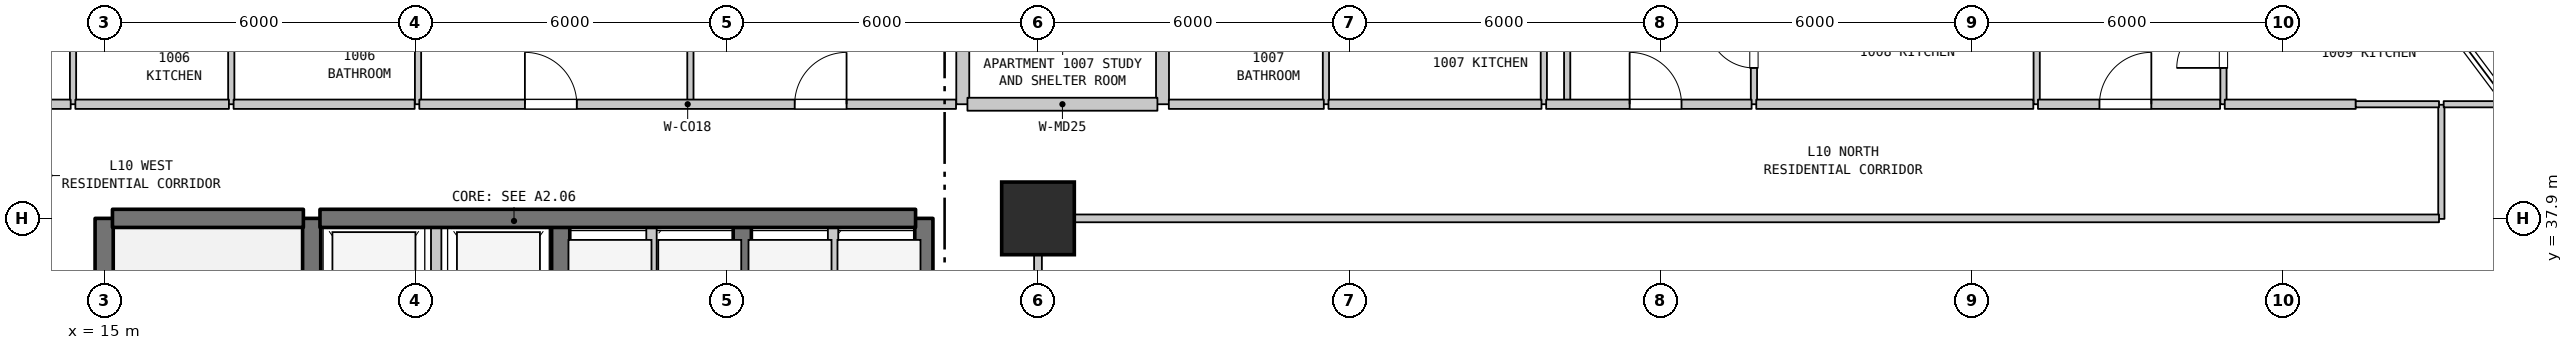
"""IFC4 building model, lengths in metres.
Left out: names, types, materials, properties, quantities, classifications, styles, units other than length and angle.
Written with IfcOpenShell. Run it as: python <this file> out.ifc"""

import sys

from ifc_helpers import new_model, si_unit, direction, frame, frame_2d, origin, origin_2d, place, context, subcontext, project, spatial, rectangle, extrude, element, fill, save


model = new_model("IFC4")
c1 = context("Model", 3, precision=1e-05, world=origin(), true_north=direction((0.0, 1.0)))
c2 = subcontext(c1, "Body", "Model", "MODEL_VIEW")
j1 = project(units=[si_unit("LENGTHUNIT", "METRE"), si_unit("PLANEANGLEUNIT", "RADIAN")], contexts=[c1])
p1 = place(None, origin())
s1 = spatial("IfcSite", under=j1, at=p1, CompositionType="ELEMENT")
p2 = place(p1, origin())
s2 = spatial("IfcBuilding", under=s1, at=p2, CompositionType="ELEMENT")
p3 = place(p2, frame((0.0, 0.0, 46.2)))
s3 = spatial("IfcBuildingStorey", under=s2, at=p3, CompositionType="ELEMENT", Elevation=46.2)
p4 = place(p3, frame((33.0, 37.9, 0.0), z_axis=(0.0, 0.0, 1.0), x_axis=(1.0, 0.0, 0.0)))
e1 = element("IfcColumn", 1, at=p4, inside=s3, PredefinedType="COLUMN", context=c2, shape_type="SweptSolid", body=[
    extrude(rectangle(XDim=1.4, YDim=1.4, at=origin_2d()), origin(), (0.0, 0.0, 1.0), 3.7),
])
p5 = place(p3, frame((14.4, 40.1, 0.0), z_axis=(0.0, 0.0, 1.0), x_axis=(0.0, 1.0, 0.0)))
e2 = element("IfcWall", 2, at=p5, inside=s3, PredefinedType="PARTITIONING", context=c2, shape_type="SweptSolid", body=[
    extrude(rectangle(XDim=2.3, YDim=0.12, at=frame_2d((1.15, 0.0))), origin(), (0.0, 0.0, 1.0), 3.385),
])
p6 = place(p3, frame((15.0, 31.1, 0.0), z_axis=(0.0, 0.0, 1.0), x_axis=(0.0, 1.0, 0.0)))
e3 = element("IfcWall", 3, at=p6, inside=s3, PredefinedType="SHEAR", context=c2, shape_type="SweptSolid", body=[
    extrude(rectangle(XDim=6.8, YDim=0.35, at=frame_2d((3.4, 0.0))), origin(), (0.0, 0.0, 1.0), 3.385),
])
p7 = place(p3, frame((17.45, 40.1, 0.0), z_axis=(0.0, 0.0, 1.0), x_axis=(0.0, 1.0, 0.0)))
e4 = element("IfcWall", 4, at=p7, inside=s3, PredefinedType="PARTITIONING", context=c2, shape_type="SweptSolid", body=[
    extrude(rectangle(XDim=2.3, YDim=0.12, at=frame_2d((1.15, 0.0))), origin(), (0.0, 0.0, 1.0), 3.385),
])
p8 = place(p3, frame((19.0, 35.0, 0.0), z_axis=(0.0, 0.0, 1.0), x_axis=(0.0, 1.0, 0.0)))
e5 = element("IfcWall", 5, at=p8, inside=s3, PredefinedType="SHEAR", context=c2, shape_type="SweptSolid", body=[
    extrude(rectangle(XDim=2.9, YDim=0.35, at=frame_2d((1.45, 0.0))), origin(), (0.0, 0.0, 1.0), 3.385),
])
p9 = place(p3, frame((21.05, 40.1, 0.0), z_axis=(0.0, 0.0, 1.0), x_axis=(0.0, 1.0, 0.0)))
e6 = element("IfcWall", 6, at=p9, inside=s3, PredefinedType="PARTITIONING", context=c2, shape_type="SweptSolid", body=[
    extrude(rectangle(XDim=2.3, YDim=0.12, at=frame_2d((1.15, 0.0))), origin(), (0.0, 0.0, 1.0), 3.025),
])
p10 = place(p3, frame((21.4, 35.0, 0.0), z_axis=(0.0, 0.0, 1.0), x_axis=(0.0, 1.0, 0.0)))
e7 = element("IfcWall", 7, at=p10, inside=s3, PredefinedType="STANDARD", context=c2, shape_type="SweptSolid", body=[
    extrude(rectangle(XDim=2.9, YDim=0.2, at=frame_2d((1.45, 0.0))), origin(), (0.0, 0.0, 1.0), 3.385),
])
p11 = place(p3, frame((23.8, 35.0, 0.0), z_axis=(0.0, 0.0, 1.0), x_axis=(0.0, 1.0, 0.0)))
e8 = element("IfcWall", 8, at=p11, inside=s3, PredefinedType="SHEAR", context=c2, shape_type="SweptSolid", body=[
    extrude(rectangle(XDim=2.9, YDim=0.35, at=frame_2d((1.45, 0.0))), origin(), (0.0, 0.0, 1.0), 3.385),
])
p12 = place(p3, frame((25.55, 35.0, 0.0), z_axis=(0.0, 0.0, 1.0), x_axis=(0.0, 1.0, 0.0)))
e9 = element("IfcWall", 9, at=p12, inside=s3, PredefinedType="STANDARD", context=c2, shape_type="SweptSolid", body=[
    extrude(rectangle(XDim=2.9, YDim=0.2, at=frame_2d((1.45, 0.0))), origin(), (0.0, 0.0, 1.0), 3.385),
])
p13 = place(p3, frame((26.3, 40.1, 0.0), z_axis=(0.0, 0.0, 1.0), x_axis=(0.0, 1.0, 0.0)))
e10 = element("IfcWall", 10, at=p13, inside=s3, PredefinedType="PARTITIONING", context=c2, shape_type="SweptSolid", body=[
    extrude(rectangle(XDim=2.05, YDim=0.12, at=frame_2d((1.025, 0.0))), origin(), (0.0, 0.0, 1.0), 3.385),
])
p14 = place(p3, frame((27.3, 35.0, 0.0), z_axis=(0.0, 0.0, 1.0), x_axis=(0.0, 1.0, 0.0)))
e11 = element("IfcWall", 11, at=p14, inside=s3, PredefinedType="SHEAR", context=c2, shape_type="SweptSolid", body=[
    extrude(rectangle(XDim=2.9, YDim=0.35, at=frame_2d((1.45, 0.0))), origin(), (0.0, 0.0, 1.0), 3.385),
])
p15 = place(p3, frame((29.05, 35.0, 0.0), z_axis=(0.0, 0.0, 1.0), x_axis=(0.0, 1.0, 0.0)))
e12 = element("IfcWall", 12, at=p15, inside=s3, PredefinedType="STANDARD", context=c2, shape_type="SweptSolid", body=[
    extrude(rectangle(XDim=2.9, YDim=0.2, at=frame_2d((1.45, 0.0))), origin(), (0.0, 0.0, 1.0), 3.385),
])
p16 = place(p3, frame((30.8, 35.0, 0.0), z_axis=(0.0, 0.0, 1.0), x_axis=(0.0, 1.0, 0.0)))
e13 = element("IfcWall", 13, at=p16, inside=s3, PredefinedType="SHEAR", context=c2, shape_type="SweptSolid", body=[
    extrude(rectangle(XDim=2.9, YDim=0.35, at=frame_2d((1.45, 0.0))), origin(), (0.0, 0.0, 1.0), 3.385),
])
p17 = place(p3, frame((31.55, 40.1, 0.0), z_axis=(0.0, 0.0, 1.0), x_axis=(0.0, 1.0, 0.0)))
e14 = element("IfcWall", 14, at=p17, inside=s3, PredefinedType="STANDARD", context=c2, shape_type="SweptSolid", body=[
    extrude(rectangle(XDim=2.3, YDim=0.25, at=frame_2d((1.15, 0.0))), origin(), (0.0, 0.0, 1.0), 3.385),
])
p18 = place(p3, frame((33.0, 27.91, 0.0), z_axis=(0.0, 0.0, 1.0), x_axis=(0.0, 1.0, 0.0)))
e15 = element("IfcWall", 15, at=p18, inside=s3, PredefinedType="STANDARD", context=c2, shape_type="SweptSolid", body=[
    extrude(rectangle(XDim=9.98, YDim=0.15, at=frame_2d((4.99, 0.0))), origin(), (0.0, 0.0, 1.0), 2.885),
])
p19 = place(p3, frame((35.4, 40.1, 0.0), z_axis=(0.0, 0.0, 1.0), x_axis=(0.0, 1.0, 0.0)))
e16 = element("IfcWall", 16, at=p19, inside=s3, PredefinedType="STANDARD", context=c2, shape_type="SweptSolid", body=[
    extrude(rectangle(XDim=2.3, YDim=0.25, at=frame_2d((1.15, 0.0))), origin(), (0.0, 0.0, 1.0), 3.385),
])
for number, where, z_axis, x_axis in (
    (17, (38.55, 40.1, 0.0), (0.0, 0.0, 1.0), (0.0, 1.0, 0.0)),
    (18, (42.75, 40.1, 0.0), (0.0, 0.0, 1.0), (0.0, 1.0, 0.0)),
):
    element("IfcWall", number, at=place(p3, frame(where, z_axis=z_axis, x_axis=x_axis)), inside=s3, PredefinedType="PARTITIONING", context=c2, shape_type="SweptSolid", body=[
        extrude(rectangle(XDim=2.3, YDim=0.12, at=frame_2d((1.15, 0.0))), origin(), (0.0, 0.0, 1.0), 3.385),
    ])
p20 = place(p3, frame((43.2, 40.1, 0.0), z_axis=(0.0, 0.0, 1.0), x_axis=(0.0, 1.0, 0.0)))
e19 = element("IfcWall", 19, at=p20, inside=s3, PredefinedType="PARTITIONING", context=c2, shape_type="SweptSolid", body=[
    extrude(rectangle(XDim=13.79, YDim=0.12, at=frame_2d((6.895, 0.0))), origin(), (0.0, 0.0, 1.0), 3.385),
])
p21 = place(p3, frame((46.8, 40.1, 0.0), z_axis=(0.0, 0.0, 1.0), x_axis=(0.0, 1.0, 0.0)))
e20 = element("IfcWall", 20, at=p21, inside=s3, PredefinedType="PARTITIONING", context=c2, shape_type="SweptSolid", body=[
    extrude(rectangle(XDim=2.3, YDim=0.12, at=frame_2d((1.15, 0.0))), origin(), (0.0, 0.0, 1.0), 3.385),
])
p22 = place(p21, frame((0.7, 0.0, 0.0)))
e21 = element("IfcOpeningElement", 21, at=p22, cuts=e20, PredefinedType="OPENING", context=c2, shape_type="SweptSolid", body=[
    extrude(rectangle(XDim=0.9, YDim=2.15, at=frame_2d((0.45, 1.075))), frame((0.0, 0.07, 0.0), z_axis=(0.0, -1.0, 0.0), x_axis=(1.0, 0.0, 0.0)), (0.0, 0.0, 1.0), 0.14),
])
p23 = place(p3, frame((52.25, 40.1, 0.0), z_axis=(0.0, 0.0, 1.0), x_axis=(0.0, 1.0, 0.0)))
e22 = element("IfcWall", 22, at=p23, inside=s3, PredefinedType="PARTITIONING", context=c2, shape_type="SweptSolid", body=[
    extrude(rectangle(XDim=2.3, YDim=0.12, at=frame_2d((1.15, 0.0))), origin(), (0.0, 0.0, 1.0), 3.385),
])
p24 = place(p3, frame((55.85, 40.1, 0.0), z_axis=(0.0, 0.0, 1.0), x_axis=(0.0, 1.0, 0.0)))
e23 = element("IfcWall", 23, at=p24, inside=s3, PredefinedType="PARTITIONING", context=c2, shape_type="SweptSolid", body=[
    extrude(rectangle(XDim=2.3, YDim=0.12, at=frame_2d((1.15, 0.0))), origin(), (0.0, 0.0, 1.0), 3.385),
])
p25 = place(p24, frame((0.7, 0.0, 0.0)))
e24 = element("IfcOpeningElement", 24, at=p25, cuts=e23, PredefinedType="OPENING", context=c2, shape_type="SweptSolid", body=[
    extrude(rectangle(XDim=0.9, YDim=2.15, at=frame_2d((0.45, 1.075))), frame((0.0, 0.07, 0.0), z_axis=(0.0, -1.0, 0.0), x_axis=(1.0, 0.0, 0.0)), (0.0, 0.0, 1.0), 0.14),
])
p26 = place(p3, frame((60.05, 37.89, 0.0), z_axis=(0.0, 0.0, 1.0), x_axis=(0.0, 1.0, 0.0)))
e25 = element("IfcWall", 25, at=p26, inside=s3, PredefinedType="PARTITIONING", context=c2, shape_type="SweptSolid", body=[
    extrude(rectangle(XDim=2.2, YDim=0.12, at=frame_2d((1.1, 0.0))), origin(), (0.0, 0.0, 1.0), 3.385),
])
p27 = place(p3, frame((15.16, 37.9, 0.0), z_axis=(0.0, 0.0, 1.0), x_axis=(1.0, 0.0, 0.0)))
e26 = element("IfcWall", 26, at=p27, inside=s3, PredefinedType="SHEAR", context=c2, shape_type="SweptSolid", body=[
    extrude(rectangle(XDim=3.68, YDim=0.35, at=frame_2d((1.84, 0.0))), origin(), (0.0, 0.0, 1.0), 3.385),
])
p28 = place(p3, frame((19.16, 37.9, 0.0), z_axis=(0.0, 0.0, 1.0), x_axis=(1.0, 0.0, 0.0)))
e27 = element("IfcWall", 27, at=p28, inside=s3, PredefinedType="SHEAR", context=c2, shape_type="SweptSolid", body=[
    extrude(rectangle(XDim=11.48, YDim=0.35, at=frame_2d((5.74, 0.0))), origin(), (0.0, 0.0, 1.0), 3.385),
])
p29 = place(p3, frame((33.07, 37.9, 0.0), z_axis=(0.0, 0.0, 1.0), x_axis=(1.0, 0.0, 0.0)))
e28 = element("IfcWall", 28, at=p29, inside=s3, PredefinedType="STANDARD", context=c2, shape_type="SweptSolid", body=[
    extrude(rectangle(XDim=26.935, YDim=0.15, at=frame_2d((13.467, 0.0))), origin(), (0.0, 0.0, 1.0), 3.385),
])
p30 = place(p3, frame((12.875, 40.1, 0.0), z_axis=(0.0, 0.0, 1.0), x_axis=(1.0, 0.0, 0.0)))
e29 = element("IfcWall", 29, at=p30, inside=s3, PredefinedType="STANDARD", context=c2, shape_type="SweptSolid", body=[
    extrude(rectangle(XDim=1.48, YDim=0.18, at=frame_2d((0.74, 0.0))), origin(), (0.0, 0.0, 1.0), 3.385),
])
p31 = place(p3, frame((14.445, 40.1, 0.0), z_axis=(0.0, 0.0, 1.0), x_axis=(1.0, 0.0, 0.0)))
e30 = element("IfcWall", 30, at=p31, inside=s3, PredefinedType="STANDARD", context=c2, shape_type="SweptSolid", body=[
    extrude(rectangle(XDim=2.96, YDim=0.18, at=frame_2d((1.48, 0.0))), origin(), (0.0, 0.0, 1.0), 3.385),
])
p32 = place(p3, frame((17.495, 40.1, 0.0), z_axis=(0.0, 0.0, 1.0), x_axis=(1.0, 0.0, 0.0)))
e31 = element("IfcWall", 31, at=p32, inside=s3, PredefinedType="STANDARD", context=c2, shape_type="SweptSolid", body=[
    extrude(rectangle(XDim=3.49, YDim=0.18, at=frame_2d((1.745, 0.0))), origin(), (0.0, 0.0, 1.0), 3.385),
])
p33 = place(p3, frame((21.075, 40.1, 0.0), z_axis=(0.0, 0.0, 1.0), x_axis=(1.0, 0.0, 0.0)))
e32 = element("IfcWall", 32, at=p33, inside=s3, PredefinedType="STANDARD", context=c2, shape_type="SweptSolid", body=[
    extrude(rectangle(XDim=10.345, YDim=0.18, at=frame_2d((5.172, 0.0))), origin(), (0.0, 0.0, 1.0), 3.385),
])
p34 = place(p33, frame((2.035, 0.0, 0.0)))
e33 = element("IfcOpeningElement", 33, at=p34, cuts=e32, PredefinedType="OPENING", context=c2, shape_type="SweptSolid", body=[
    extrude(rectangle(XDim=1.0, YDim=2.15, at=frame_2d((0.5, 1.075))), frame((0.0, 0.1, 0.0), z_axis=(0.0, -1.0, 0.0), x_axis=(1.0, 0.0, 0.0)), (0.0, 0.0, 1.0), 0.2),
])
p35 = place(p33, frame((7.235, 0.0, 0.0)))
e34 = element("IfcOpeningElement", 34, at=p35, cuts=e32, PredefinedType="OPENING", context=c2, shape_type="SweptSolid", body=[
    extrude(rectangle(XDim=1.0, YDim=2.15, at=frame_2d((0.5, 1.075))), frame((0.0, 0.1, 0.0), z_axis=(0.0, -1.0, 0.0), x_axis=(1.0, 0.0, 0.0)), (0.0, 0.0, 1.0), 0.2),
])
p36 = place(p3, frame((31.64, 40.1, 0.0), z_axis=(0.0, 0.0, 1.0), x_axis=(1.0, 0.0, 0.0)))
e35 = element("IfcWall", 35, at=p36, inside=s3, PredefinedType="STANDARD", context=c2, shape_type="SweptSolid", body=[
    extrude(rectangle(XDim=3.662, YDim=0.25, at=frame_2d((1.831, 0.0))), origin(), (0.0, 0.0, 1.0), 3.385),
])
p37 = place(p3, frame((35.522, 40.1, 0.0), z_axis=(0.0, 0.0, 1.0), x_axis=(1.0, 0.0, 0.0)))
e36 = element("IfcWall", 36, at=p37, inside=s3, PredefinedType="STANDARD", context=c2, shape_type="SweptSolid", body=[
    extrude(rectangle(XDim=2.987, YDim=0.18, at=frame_2d((1.494, 0.0))), origin(), (0.0, 0.0, 1.0), 3.385),
])
p38 = place(p3, frame((38.599, 40.1, 0.0), z_axis=(0.0, 0.0, 1.0), x_axis=(1.0, 0.0, 0.0)))
e37 = element("IfcWall", 37, at=p38, inside=s3, PredefinedType="STANDARD", context=c2, shape_type="SweptSolid", body=[
    extrude(rectangle(XDim=4.106, YDim=0.18, at=frame_2d((2.053, 0.0))), origin(), (0.0, 0.0, 1.0), 3.385),
])
p39 = place(p3, frame((42.795, 40.1, 0.0), z_axis=(0.0, 0.0, 1.0), x_axis=(1.0, 0.0, 0.0)))
e38 = element("IfcWall", 38, at=p39, inside=s3, PredefinedType="STANDARD", context=c2, shape_type="SweptSolid", body=[
    extrude(rectangle(XDim=3.96, YDim=0.18, at=frame_2d((1.98, 0.0))), origin(), (0.0, 0.0, 1.0), 3.385),
])
p40 = place(p39, frame((1.609, 0.0, 0.0)))
e39 = element("IfcOpeningElement", 39, at=p40, cuts=e38, PredefinedType="OPENING", context=c2, shape_type="SweptSolid", body=[
    extrude(rectangle(XDim=1.0, YDim=2.15, at=frame_2d((0.5, 1.075))), frame((0.0, 0.1, 0.0), z_axis=(0.0, -1.0, 0.0), x_axis=(1.0, 0.0, 0.0)), (0.0, 0.0, 1.0), 0.2),
])
p41 = place(p3, frame((46.845, 40.1, 0.0), z_axis=(0.0, 0.0, 1.0), x_axis=(1.0, 0.0, 0.0)))
e40 = element("IfcWall", 40, at=p41, inside=s3, PredefinedType="STANDARD", context=c2, shape_type="SweptSolid", body=[
    extrude(rectangle(XDim=5.34, YDim=0.18, at=frame_2d((2.67, 0.0))), origin(), (0.0, 0.0, 1.0), 3.385),
])
p42 = place(p3, frame((52.275, 40.1, 0.0), z_axis=(0.0, 0.0, 1.0), x_axis=(1.0, 0.0, 0.0)))
e41 = element("IfcWall", 41, at=p42, inside=s3, PredefinedType="STANDARD", context=c2, shape_type="SweptSolid", body=[
    extrude(rectangle(XDim=3.51, YDim=0.18, at=frame_2d((1.755, 0.0))), origin(), (0.0, 0.0, 1.0), 3.385),
])
p43 = place(p42, frame((1.185, 0.0, 0.0)))
e42 = element("IfcOpeningElement", 42, at=p43, cuts=e41, PredefinedType="OPENING", context=c2, shape_type="SweptSolid", body=[
    extrude(rectangle(XDim=1.0, YDim=2.15, at=frame_2d((0.5, 1.075))), frame((0.0, 0.1, 0.0), z_axis=(0.0, -1.0, 0.0), x_axis=(1.0, 0.0, 0.0)), (0.0, 0.0, 1.0), 0.2),
])
p44 = place(p3, frame((55.875, 40.1, 0.0), z_axis=(0.0, 0.0, 1.0), x_axis=(1.0, 0.0, 0.0)))
e43 = element("IfcWall", 43, at=p44, inside=s3, PredefinedType="STANDARD", context=c2, shape_type="SweptSolid", body=[
    extrude(rectangle(XDim=2.525, YDim=0.18, at=frame_2d((1.262, 0.0))), origin(), (0.0, 0.0, 1.0), 3.385),
])
p45 = place(p3, frame((58.4, 40.1, 0.0), z_axis=(0.0, 0.0, 1.0), x_axis=(1.0, 0.0, 0.0)))
e44 = element("IfcWall", 44, at=p45, inside=s3, PredefinedType="PARTITIONING", context=c2, shape_type="SweptSolid", body=[
    extrude(rectangle(XDim=1.605, YDim=0.12, at=frame_2d((0.802, 0.0))), origin(), (0.0, 0.0, 1.0), 3.385),
])
p46 = place(p3, frame((60.095, 40.1, 0.0), z_axis=(0.0, 0.0, 1.0), x_axis=(1.0, 0.0, 0.0)))
e45 = element("IfcWall", 45, at=p46, inside=s3, PredefinedType="PARTITIONING", context=c2, shape_type="SweptSolid", body=[
    extrude(rectangle(XDim=1.245, YDim=0.12, at=frame_2d((0.623, 0.0))), origin(), (0.0, 0.0, 1.0), 3.385),
])
p47 = place(p22, origin())
e46 = element("IfcDoor", 46, at=p47, inside=s3, OperationType="SINGLE_SWING_RIGHT", PredefinedType="DOOR", context=c2, shape_type="SweptSolid", body=[
    extrude(rectangle(XDim=0.9, YDim=2.15, at=frame_2d((0.45, 1.075))), frame((0.0, 0.025, 0.0), z_axis=(0.0, -1.0, 0.0), x_axis=(1.0, 0.0, 0.0)), (0.0, 0.0, 1.0), 0.05),
])
fill(e21, e46)
p48 = place(p25, origin())
e47 = element("IfcDoor", 47, at=p48, inside=s3, OperationType="SINGLE_SWING_LEFT", PredefinedType="DOOR", context=c2, shape_type="SweptSolid", body=[
    extrude(rectangle(XDim=0.9, YDim=2.15, at=frame_2d((0.45, 1.075))), frame((0.0, 0.025, 0.0), z_axis=(0.0, -1.0, 0.0), x_axis=(1.0, 0.0, 0.0)), (0.0, 0.0, 1.0), 0.05),
])
fill(e24, e47)
p49 = place(p34, origin())
e48 = element("IfcDoor", 48, at=p49, inside=s3, OperationType="SINGLE_SWING_LEFT", PredefinedType="DOOR", context=c2, shape_type="SweptSolid", body=[
    extrude(rectangle(XDim=1.0, YDim=2.15, at=frame_2d((0.5, 1.075))), frame((0.0, 0.025, 0.0), z_axis=(0.0, -1.0, 0.0), x_axis=(1.0, 0.0, 0.0)), (0.0, 0.0, 1.0), 0.05),
])
fill(e33, e48)
p50 = place(p35, origin())
e49 = element("IfcDoor", 49, at=p50, inside=s3, OperationType="SINGLE_SWING_RIGHT", PredefinedType="DOOR", context=c2, shape_type="SweptSolid", body=[
    extrude(rectangle(XDim=1.0, YDim=2.15, at=frame_2d((0.5, 1.075))), frame((0.0, 0.025, 0.0), z_axis=(0.0, -1.0, 0.0), x_axis=(1.0, 0.0, 0.0)), (0.0, 0.0, 1.0), 0.05),
])
fill(e34, e49)
p51 = place(p40, origin())
e50 = element("IfcDoor", 50, at=p51, inside=s3, OperationType="SINGLE_SWING_LEFT", PredefinedType="DOOR", context=c2, shape_type="SweptSolid", body=[
    extrude(rectangle(XDim=1.0, YDim=2.15, at=frame_2d((0.5, 1.075))), frame((0.0, 0.025, 0.0), z_axis=(0.0, -1.0, 0.0), x_axis=(1.0, 0.0, 0.0)), (0.0, 0.0, 1.0), 0.05),
])
fill(e39, e50)
p52 = place(p43, origin())
e51 = element("IfcDoor", 51, at=p52, inside=s3, OperationType="SINGLE_SWING_RIGHT", PredefinedType="DOOR", context=c2, shape_type="SweptSolid", body=[
    extrude(rectangle(XDim=1.0, YDim=2.15, at=frame_2d((0.5, 1.075))), frame((0.0, 0.025, 0.0), z_axis=(0.0, -1.0, 0.0), x_axis=(1.0, 0.0, 0.0)), (0.0, 0.0, 1.0), 0.05),
])
fill(e42, e51)
save(model, sys.argv[1])
